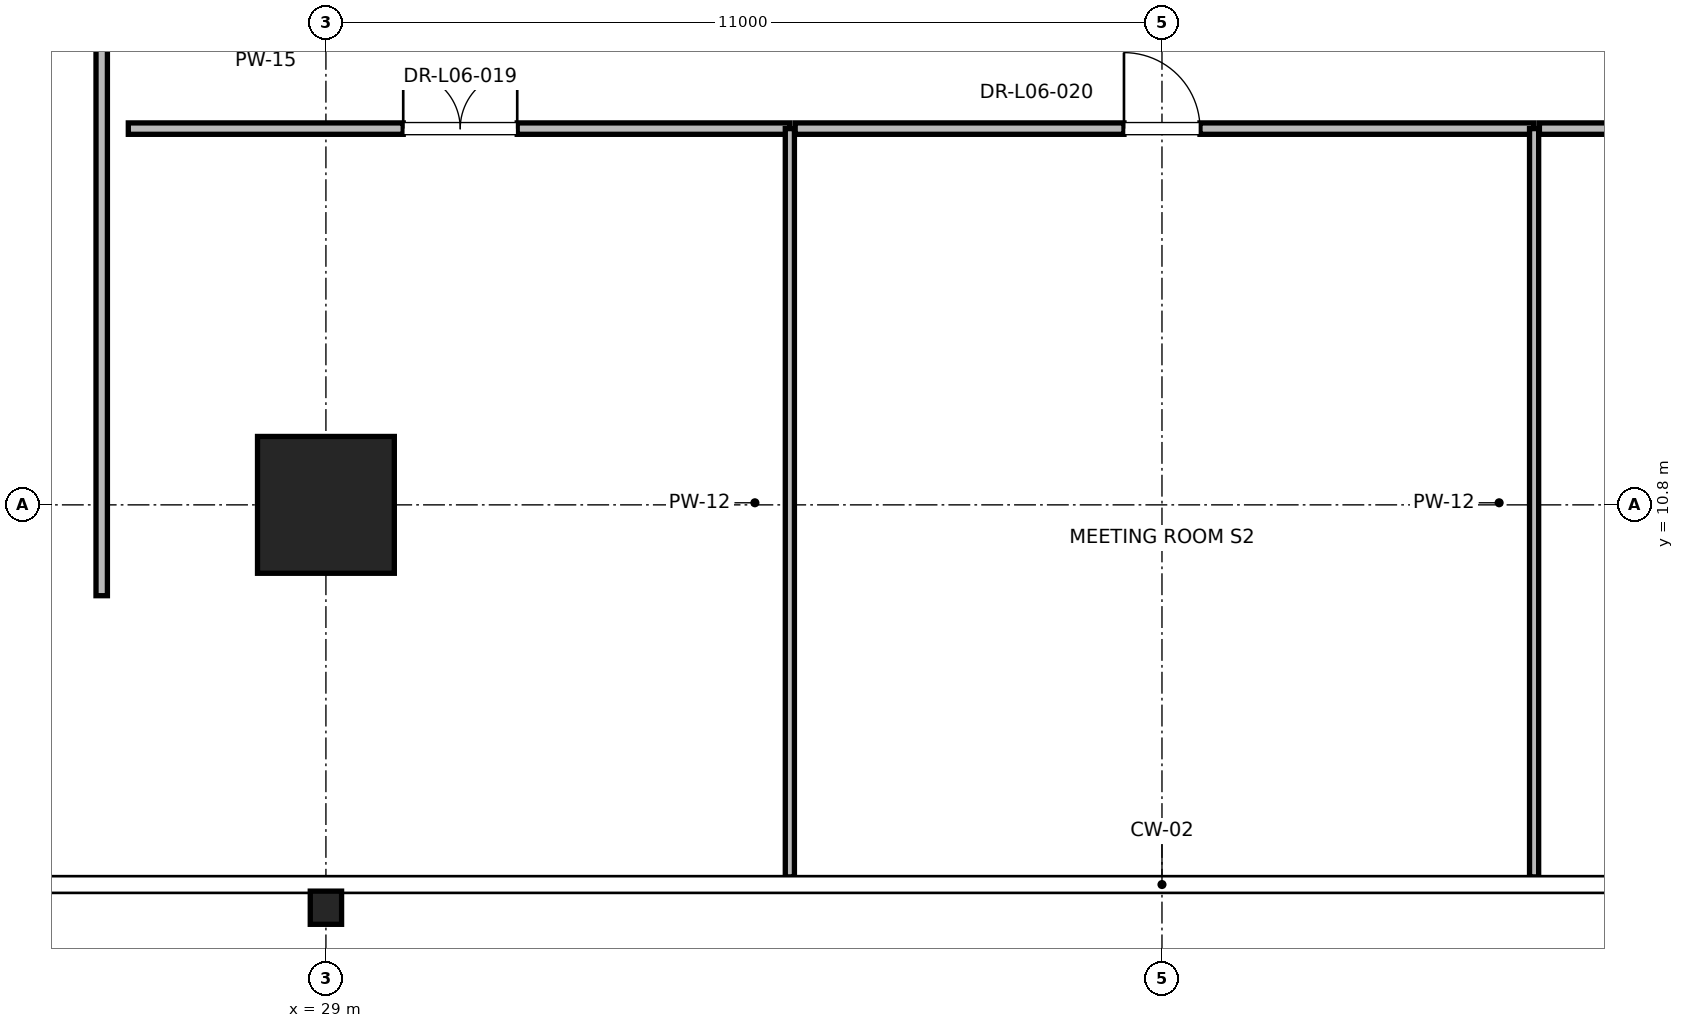
"""IFC4 building model, lengths in metres.
Left out: names, types, materials, properties, quantities, classifications, styles, units other than length and angle.
Written with IfcOpenShell. Run it as: python <this file> out.ifc"""

import sys

from ifc_helpers import new_model, si_unit, direction, frame, frame_2d, origin, origin_2d, place, context, subcontext, project, spatial, rectangle, i_section, extrude, element, fill, save


model = new_model("IFC4")
c1 = context("Model", 3, precision=1e-05, world=origin(), true_north=direction((0.0, 1.0)))
c2 = subcontext(c1, "Body", "Model", "MODEL_VIEW")
j1 = project(units=[si_unit("LENGTHUNIT", "METRE"), si_unit("PLANEANGLEUNIT", "RADIAN")], contexts=[c1])
p1 = place(None, origin())
s1 = spatial("IfcSite", under=j1, at=p1, CompositionType="ELEMENT")
p2 = place(p1, origin())
s2 = spatial("IfcBuilding", under=s1, at=p2, CompositionType="ELEMENT")
p3 = place(p2, frame((0.0, 0.0, 31.6)))
s3 = spatial("IfcBuildingStorey", under=s2, at=p3, CompositionType="ELEMENT", Elevation=31.6)
p4 = place(p3, frame((29.0, 10.8, 0.0), z_axis=(0.0, 0.0, 1.0), x_axis=(1.0, 0.0, 0.0)))
e1 = element("IfcColumn", 1, at=p4, inside=s3, PredefinedType="COLUMN", context=c2, shape_type="SweptSolid", body=[
    extrude(rectangle(XDim=1.8, YDim=1.8, at=origin_2d()), origin(), (0.0, 0.0, 1.0), 4.0),
])
p5 = place(p3, frame((29.0, 5.5, 0.0), z_axis=(0.0, 0.0, 1.0), x_axis=(1.0, 0.0, 0.0)))
e2 = element("IfcColumn", 2, at=p5, inside=s3, PredefinedType="COLUMN", context=c2, shape_type="SweptSolid", body=[
    extrude(i_section(OverallWidth=0.412, OverallDepth=0.437, WebThickness=0.036, FlangeThickness=0.058, FilletRadius=0.015, at=origin_2d()), origin(), (0.0, 0.0, 1.0), 4.0),
])
p6 = place(p3, frame((26.4, 15.75, 0.0), z_axis=(0.0, 0.0, 1.0), x_axis=(1.0, 0.0, 0.0)))
e3 = element("IfcWall", 3, at=p6, inside=s3, PredefinedType="PARTITIONING", context=c2, shape_type="SweptSolid", body=[
    extrude(rectangle(XDim=8.704, YDim=0.15, at=frame_2d((4.352, 0.0))), origin(), (0.0, 0.0, 1.0), 2.85),
])
p7 = place(p6, frame((3.617, 0.0, 0.0)))
e4 = element("IfcOpeningElement", 4, at=p7, cuts=e3, PredefinedType="OPENING", context=c2, shape_type="SweptSolid", body=[
    extrude(rectangle(XDim=1.5, YDim=2.25, at=frame_2d((0.75, 1.125))), frame((0.0, 0.075, 0.0), z_axis=(0.0, -1.0, 0.0), x_axis=(1.0, 0.0, 0.0)), (0.0, 0.0, 1.0), 0.15),
])
p8 = place(p3, frame((35.104, 5.905, 0.0), z_axis=(0.0, 0.0, 1.0), x_axis=(0.0, 1.0, 0.0)))
e5 = element("IfcWall", 5, at=p8, inside=s3, PredefinedType="PARTITIONING", context=c2, shape_type="SweptSolid", body=[
    extrude(rectangle(XDim=9.845, YDim=0.12, at=frame_2d((4.922, 0.0))), origin(), (0.0, 0.0, 1.0), 2.39),
])
p9 = place(p3, frame((35.174, 15.75, 0.0), z_axis=(0.0, 0.0, 1.0), x_axis=(1.0, 0.0, 0.0)))
e6 = element("IfcWall", 6, at=p9, inside=s3, PredefinedType="PARTITIONING", context=c2, shape_type="SweptSolid", body=[
    extrude(rectangle(XDim=9.722, YDim=0.15, at=frame_2d((4.861, 0.0))), origin(), (0.0, 0.0, 1.0), 2.85),
])
p10 = place(p9, frame((4.326, 0.0, 0.0)))
e7 = element("IfcOpeningElement", 7, at=p10, cuts=e6, PredefinedType="OPENING", context=c2, shape_type="SweptSolid", body=[
    extrude(rectangle(XDim=1.0, YDim=2.15, at=frame_2d((0.5, 1.075))), frame((0.0, 0.075, 0.0), z_axis=(0.0, -1.0, 0.0), x_axis=(1.0, 0.0, 0.0)), (0.0, 0.0, 1.0), 0.15),
])
p11 = place(p3, frame((44.896, 5.905, 0.0), z_axis=(0.0, 0.0, 1.0), x_axis=(0.0, 1.0, 0.0)))
e8 = element("IfcWall", 8, at=p11, inside=s3, PredefinedType="PARTITIONING", context=c2, shape_type="SweptSolid", body=[
    extrude(rectangle(XDim=9.845, YDim=0.12, at=frame_2d((4.922, 0.0))), origin(), (0.0, 0.0, 1.0), 2.39),
])
p12 = place(p3, frame((44.966, 15.75, 0.0), z_axis=(0.0, 0.0, 1.0), x_axis=(1.0, 0.0, 0.0)))
e9 = element("IfcWall", 9, at=p12, inside=s3, PredefinedType="PARTITIONING", context=c2, shape_type="SweptSolid", body=[
    extrude(rectangle(XDim=8.634, YDim=0.15, at=frame_2d((4.317, 0.0))), origin(), (0.0, 0.0, 1.0), 2.85),
])
p13 = place(p12, frame((3.767, 0.0, 0.0)))
e10 = element("IfcOpeningElement", 10, at=p13, cuts=e9, PredefinedType="OPENING", context=c2, shape_type="SweptSolid", body=[
    extrude(rectangle(XDim=1.0, YDim=2.15, at=frame_2d((0.5, 1.075))), frame((0.0, 0.075, 0.0), z_axis=(0.0, -1.0, 0.0), x_axis=(1.0, 0.0, 0.0)), (0.0, 0.0, 1.0), 0.15),
])
p14 = place(p3, frame((26.05, 9.605, 0.0), z_axis=(0.0, 0.0, 1.0), x_axis=(0.0, 1.0, 0.0)))
e11 = element("IfcWall", 11, at=p14, inside=s3, PredefinedType="PARTITIONING", context=c2, shape_type="SweptSolid", body=[
    extrude(rectangle(XDim=35.79, YDim=0.15, at=frame_2d((17.895, 0.0))), origin(), (0.0, 0.0, 1.0), 2.85),
])
p15 = place(p14, frame((17.395, 0.0, 0.0)))
e12 = element("IfcOpeningElement", 12, at=p15, cuts=e11, PredefinedType="OPENING", context=c2, shape_type="SweptSolid", body=[
    extrude(rectangle(XDim=1.0, YDim=2.15, at=frame_2d((0.5, 1.075))), frame((0.0, 0.075, 0.0), z_axis=(0.0, -1.0, 0.0), x_axis=(1.0, 0.0, 0.0)), (0.0, 0.0, 1.0), 0.15),
])
p16 = place(p7, origin())
e13 = element("IfcDoor", 13, at=p16, inside=s3, OperationType="DOUBLE_DOOR_SINGLE_SWING", PredefinedType="DOOR", context=c2, shape_type="SweptSolid", body=[
    extrude(rectangle(XDim=1.5, YDim=2.25, at=frame_2d((0.75, 1.125))), frame((0.0, 0.025, 0.0), z_axis=(0.0, -1.0, 0.0), x_axis=(1.0, 0.0, 0.0)), (0.0, 0.0, 1.0), 0.05),
])
fill(e4, e13)
p17 = place(p10, origin())
e14 = element("IfcDoor", 14, at=p17, inside=s3, OperationType="SINGLE_SWING_LEFT", PredefinedType="DOOR", context=c2, shape_type="SweptSolid", body=[
    extrude(rectangle(XDim=1.0, YDim=2.15, at=frame_2d((0.5, 1.075))), frame((0.0, 0.025, 0.0), z_axis=(0.0, -1.0, 0.0), x_axis=(1.0, 0.0, 0.0)), (0.0, 0.0, 1.0), 0.05),
])
fill(e7, e14)
save(model, sys.argv[1])
